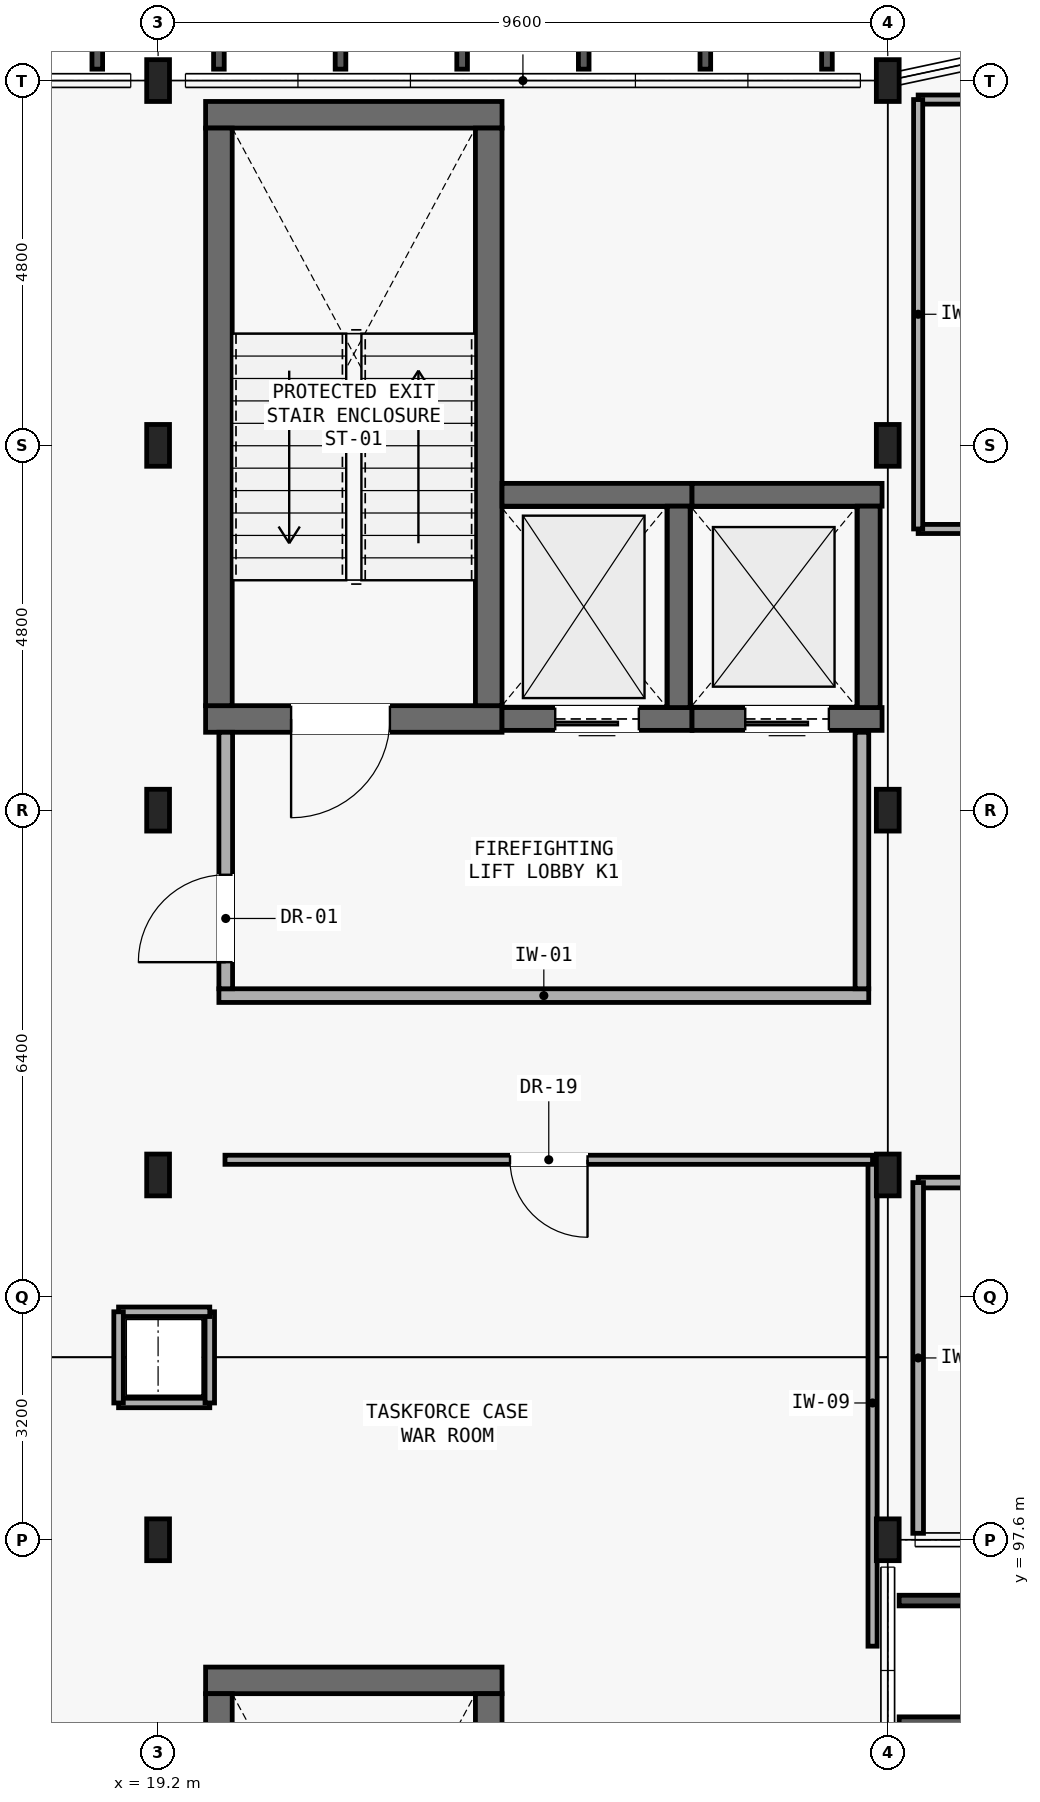
"""IFC4 building model, lengths in metres.
Left out: names, types, materials, properties, quantities, classifications, styles, units other than length and angle.
Written with IfcOpenShell. Run it as: python <this file> out.ifc"""

import sys

from ifc_helpers import new_model, si_unit, direction, frame, frame_2d, origin, origin_2d, place, context, subcontext, project, spatial, rectangle, i_section, extrude, element, fill, save


model = new_model("IFC4")
c1 = context("Model", 3, precision=1e-05, world=origin(), true_north=direction((0.0, 1.0)))
c2 = subcontext(c1, "Body", "Model", "MODEL_VIEW")
j1 = project(units=[si_unit("LENGTHUNIT", "METRE"), si_unit("PLANEANGLEUNIT", "RADIAN")], contexts=[c1])
p1 = place(None, origin())
s1 = spatial("IfcSite", under=j1, at=p1, CompositionType="ELEMENT")
p2 = place(p1, origin())
s2 = spatial("IfcBuilding", under=s1, at=p2, CompositionType="ELEMENT")
p3 = place(p2, frame((0.0, 0.0, 9.45)))
s3 = spatial("IfcBuildingStorey", under=s2, at=p3, CompositionType="ELEMENT", Elevation=9.45)
for number, where, z_axis, x_axis in (
    (1, (28.8, 97.6, 0.0), (0.0, 0.0, 1.0), (1.0, 0.0, 0.0)),
    (2, (28.8, 102.4, 0.0), (0.0, 0.0, 1.0), (1.0, 0.0, 0.0)),
    (3, (28.8, 107.2, 0.0), (0.0, 0.0, 1.0), (1.0, 0.0, 0.0)),
    (4, (28.8, 112.0, 0.0), (0.0, 0.0, 1.0), (1.0, 0.0, 0.0)),
    (5, (28.8, 116.8, 0.0), (0.0, 0.0, 1.0), (1.0, 0.0, 0.0)),
    (6, (19.2, 116.8, 0.0), (0.0, 0.0, 1.0), (1.0, 0.0, 0.0)),
    (7, (19.2, 97.6, 0.0), (0.0, 0.0, 1.0), (1.0, 0.0, 0.0)),
    (8, (19.2, 102.4, 0.0), (0.0, 0.0, 1.0), (1.0, 0.0, 0.0)),
    (9, (19.2, 107.2, 0.0), (0.0, 0.0, 1.0), (1.0, 0.0, 0.0)),
    (10, (19.2, 112.0, 0.0), (0.0, 0.0, 1.0), (1.0, 0.0, 0.0)),
):
    element("IfcColumn", number, at=place(p3, frame(where, z_axis=z_axis, x_axis=x_axis)), inside=s3, PredefinedType="COLUMN", context=c2, shape_type="SweptSolid", body=[
        extrude(i_section(OverallWidth=0.3, OverallDepth=0.55, WebThickness=0.015, FlangeThickness=0.029, FilletRadius=0.027, at=origin_2d()), origin(), (0.0, 0.0, 1.0), 4.2),
    ])
p4 = place(p3, frame((19.825, 108.4, 0.0), z_axis=(0.0, 0.0, 1.0), x_axis=(1.0, 0.0, 0.0)))
e11 = element("IfcWall", 11, at=p4, inside=s3, PredefinedType="SHEAR", context=c2, shape_type="SweptSolid", body=[
    extrude(rectangle(XDim=3.9, YDim=0.35, at=frame_2d((1.95, 0.0))), origin(), (0.0, 0.0, 1.0), 3.97),
])
p5 = place(p4, frame((1.125, 0.0, 0.0)))
e12 = element("IfcOpeningElement", 12, at=p5, cuts=e11, PredefinedType="OPENING", context=c2, shape_type="SweptSolid", body=[
    extrude(rectangle(XDim=1.3, YDim=2.15, at=frame_2d((0.65, 1.075))), frame((0.0, 0.185, 0.0), z_axis=(0.0, -1.0, 0.0), x_axis=(1.0, 0.0, 0.0)), (0.0, 0.0, 1.0), 0.37),
])
p6 = place(p3, frame((19.825, 116.35, 0.0), z_axis=(0.0, 0.0, 1.0), x_axis=(1.0, 0.0, 0.0)))
e13 = element("IfcWall", 13, at=p6, inside=s3, PredefinedType="SHEAR", context=c2, shape_type="SweptSolid", body=[
    extrude(rectangle(XDim=3.9, YDim=0.35, at=frame_2d((1.95, 0.0))), origin(), (0.0, 0.0, 1.0), 3.97),
])
for number, where, z_axis, x_axis in (
    (14, (20.0, 108.575, 0.0), (0.0, 0.0, 1.0), (0.0, 1.0, 0.0)),
    (15, (23.55, 108.575, 0.0), (0.0, 0.0, 1.0), (0.0, 1.0, 0.0)),
):
    element("IfcWall", number, at=place(p3, frame(where, z_axis=z_axis, x_axis=x_axis)), inside=s3, PredefinedType="SHEAR", context=c2, shape_type="SweptSolid", body=[
        extrude(rectangle(XDim=7.6, YDim=0.35, at=frame_2d((3.8, 0.0))), origin(), (0.0, 0.0, 1.0), 3.97),
    ])
p7 = place(p3, frame((23.725, 108.4, 0.0), z_axis=(0.0, 0.0, 1.0), x_axis=(1.0, 0.0, 0.0)))
e16 = element("IfcWall", 16, at=p7, inside=s3, PredefinedType="SHEAR", context=c2, shape_type="SweptSolid", body=[
    extrude(rectangle(XDim=2.5, YDim=0.3, at=frame_2d((1.25, 0.0))), origin(), (0.0, 0.0, 1.0), 3.97),
])
p8 = place(p7, frame((0.7, 0.0, 0.0)))
e17 = element("IfcOpeningElement", 17, at=p8, cuts=e16, PredefinedType="OPENING", context=c2, shape_type="SweptSolid", body=[
    extrude(rectangle(XDim=1.1, YDim=2.1, at=frame_2d((0.55, 1.05))), frame((0.0, 0.16, 0.0), z_axis=(0.0, -1.0, 0.0), x_axis=(1.0, 0.0, 0.0)), (0.0, 0.0, 1.0), 0.32),
])
p9 = place(p3, frame((23.725, 111.35, 0.0), z_axis=(0.0, 0.0, 1.0), x_axis=(1.0, 0.0, 0.0)))
e18 = element("IfcWall", 18, at=p9, inside=s3, PredefinedType="SHEAR", context=c2, shape_type="SweptSolid", body=[
    extrude(rectangle(XDim=2.5, YDim=0.3, at=frame_2d((1.25, 0.0))), origin(), (0.0, 0.0, 1.0), 3.97),
])
p10 = place(p3, frame((26.05, 108.55, 0.0), z_axis=(0.0, 0.0, 1.0), x_axis=(0.0, 1.0, 0.0)))
e19 = element("IfcWall", 19, at=p10, inside=s3, PredefinedType="SHEAR", context=c2, shape_type="SweptSolid", body=[
    extrude(rectangle(XDim=2.65, YDim=0.3, at=frame_2d((1.325, 0.0))), origin(), (0.0, 0.0, 1.0), 3.97),
])
p11 = place(p3, frame((26.225, 108.4, 0.0), z_axis=(0.0, 0.0, 1.0), x_axis=(1.0, 0.0, 0.0)))
e20 = element("IfcWall", 20, at=p11, inside=s3, PredefinedType="SHEAR", context=c2, shape_type="SweptSolid", body=[
    extrude(rectangle(XDim=2.5, YDim=0.3, at=frame_2d((1.25, 0.0))), origin(), (0.0, 0.0, 1.0), 3.97),
])
p12 = place(p11, frame((0.7, 0.0, 0.0)))
e21 = element("IfcOpeningElement", 21, at=p12, cuts=e20, PredefinedType="OPENING", context=c2, shape_type="SweptSolid", body=[
    extrude(rectangle(XDim=1.1, YDim=2.1, at=frame_2d((0.55, 1.05))), frame((0.0, 0.16, 0.0), z_axis=(0.0, -1.0, 0.0), x_axis=(1.0, 0.0, 0.0)), (0.0, 0.0, 1.0), 0.32),
])
p13 = place(p3, frame((26.225, 111.35, 0.0), z_axis=(0.0, 0.0, 1.0), x_axis=(1.0, 0.0, 0.0)))
e22 = element("IfcWall", 22, at=p13, inside=s3, PredefinedType="SHEAR", context=c2, shape_type="SweptSolid", body=[
    extrude(rectangle(XDim=2.5, YDim=0.3, at=frame_2d((1.25, 0.0))), origin(), (0.0, 0.0, 1.0), 3.97),
])
p14 = place(p3, frame((28.55, 108.55, 0.0), z_axis=(0.0, 0.0, 1.0), x_axis=(0.0, 1.0, 0.0)))
e23 = element("IfcWall", 23, at=p14, inside=s3, PredefinedType="SHEAR", context=c2, shape_type="SweptSolid", body=[
    extrude(rectangle(XDim=2.65, YDim=0.3, at=frame_2d((1.325, 0.0))), origin(), (0.0, 0.0, 1.0), 3.97),
])
p15 = place(p3, frame((20.0, 104.76, 0.0), z_axis=(0.0, 0.0, 1.0), x_axis=(1.0, 0.0, 0.0)))
e24 = element("IfcWall", 24, at=p15, inside=s3, PredefinedType="PARTITIONING", context=c2, shape_type="SweptSolid", body=[
    extrude(rectangle(XDim=8.55, YDim=0.18, at=frame_2d((4.275, 0.0))), origin(), (0.0, 0.0, 1.0), 3.45),
])
p16 = place(p3, frame((20.09, 104.85, 0.0), z_axis=(0.0, 0.0, 1.0), x_axis=(0.0, 1.0, 0.0)))
e25 = element("IfcWall", 25, at=p16, inside=s3, PredefinedType="PARTITIONING", context=c2, shape_type="SweptSolid", body=[
    extrude(rectangle(XDim=3.375, YDim=0.18, at=frame_2d((1.688, 0.0))), origin(), (0.0, 0.0, 1.0), 3.97),
])
p17 = place(p16, frame((0.35, 0.0, 0.0)))
e26 = element("IfcOpeningElement", 26, at=p17, cuts=e25, PredefinedType="OPENING", context=c2, shape_type="SweptSolid", body=[
    extrude(rectangle(XDim=1.15, YDim=2.15, at=frame_2d((0.575, 1.075))), frame((0.0, 0.1, 0.0), z_axis=(0.0, -1.0, 0.0), x_axis=(1.0, 0.0, 0.0)), (0.0, 0.0, 1.0), 0.2),
])
p18 = place(p3, frame((28.46, 104.85, 0.0), z_axis=(0.0, 0.0, 1.0), x_axis=(0.0, 1.0, 0.0)))
e27 = element("IfcWall", 27, at=p18, inside=s3, PredefinedType="PARTITIONING", context=c2, shape_type="SweptSolid", body=[
    extrude(rectangle(XDim=3.375, YDim=0.18, at=frame_2d((1.688, 0.0))), origin(), (0.0, 0.0, 1.0), 3.97),
])
p19 = place(p3, frame((19.825, 95.75, 0.0), z_axis=(0.0, 0.0, 1.0), x_axis=(1.0, 0.0, 0.0)))
e28 = element("IfcWall", 28, at=p19, inside=s3, PredefinedType="SHEAR", context=c2, shape_type="SweptSolid", body=[
    extrude(rectangle(XDim=3.9, YDim=0.35, at=frame_2d((1.95, 0.0))), origin(), (0.0, 0.0, 1.0), 3.97),
])
for number, where, z_axis, x_axis in (
    (29, (20.0, 87.975, 0.0), (0.0, 0.0, 1.0), (0.0, 1.0, 0.0)),
    (30, (23.55, 87.975, 0.0), (0.0, 0.0, 1.0), (0.0, 1.0, 0.0)),
):
    element("IfcWall", number, at=place(p3, frame(where, z_axis=z_axis, x_axis=x_axis)), inside=s3, PredefinedType="SHEAR", context=c2, shape_type="SweptSolid", body=[
        extrude(rectangle(XDim=7.6, YDim=0.35, at=frame_2d((3.8, 0.0))), origin(), (0.0, 0.0, 1.0), 3.97),
    ])
p20 = place(p3, frame((18.68, 99.4, 0.0), z_axis=(0.0, 0.0, 1.0), x_axis=(1.0, 0.0, 0.0)))
e31 = element("IfcWall", 31, at=p20, inside=s3, PredefinedType="PARTITIONING", context=c2, shape_type="SweptSolid", body=[
    extrude(rectangle(XDim=1.2, YDim=0.125, at=frame_2d((0.6, 0.0))), origin(), (0.0, 0.0, 1.0), 3.97),
])
p21 = place(p3, frame((19.88, 99.4, 0.0), z_axis=(0.0, 0.0, 1.0), x_axis=(0.0, 1.0, 0.0)))
e32 = element("IfcWall", 32, at=p21, inside=s3, PredefinedType="PARTITIONING", context=c2, shape_type="SweptSolid", body=[
    extrude(rectangle(XDim=1.2, YDim=0.125, at=frame_2d((0.6, 0.0))), origin(), (0.0, 0.0, 1.0), 3.97),
])
p22 = place(p3, frame((19.88, 100.6, 0.0), z_axis=(0.0, 0.0, 1.0), x_axis=(-1.0, 0.0, 0.0)))
e33 = element("IfcWall", 33, at=p22, inside=s3, PredefinedType="PARTITIONING", context=c2, shape_type="SweptSolid", body=[
    extrude(rectangle(XDim=1.2, YDim=0.125, at=frame_2d((0.6, 0.0))), origin(), (0.0, 0.0, 1.0), 3.97),
])
p23 = place(p3, frame((18.68, 100.6, 0.0), z_axis=(0.0, 0.0, 1.0), x_axis=(0.0, -1.0, 0.0)))
e34 = element("IfcWall", 34, at=p23, inside=s3, PredefinedType="PARTITIONING", context=c2, shape_type="SweptSolid", body=[
    extrude(rectangle(XDim=1.2, YDim=0.125, at=frame_2d((0.6, 0.0))), origin(), (0.0, 0.0, 1.0), 3.97),
])
p24 = place(p3, frame((28.6, 96.2, 0.0), z_axis=(0.0, 0.0, 1.0), x_axis=(0.0, 1.0, 0.0)))
e35 = element("IfcWall", 35, at=p24, inside=s3, PredefinedType="PARTITIONING", context=c2, shape_type="SweptSolid", body=[
    extrude(rectangle(XDim=6.4, YDim=0.12, at=frame_2d((3.2, 0.0))), origin(), (0.0, 0.0, 1.0), 3.41),
])
p25 = place(p3, frame((28.6, 102.6, 0.0), z_axis=(0.0, 0.0, 1.0), x_axis=(-1.0, 0.0, 0.0)))
e36 = element("IfcWall", 36, at=p25, inside=s3, PredefinedType="PARTITIONING", context=c2, shape_type="SweptSolid", body=[
    extrude(rectangle(XDim=8.52, YDim=0.12, at=frame_2d((4.26, 0.0))), origin(), (0.0, 0.0, 1.0), 3.15),
])
p26 = place(p25, frame((3.75, 0.0, 0.0)))
e37 = element("IfcOpeningElement", 37, at=p26, cuts=e36, PredefinedType="OPENING", context=c2, shape_type="SweptSolid", body=[
    extrude(rectangle(XDim=1.02, YDim=2.1, at=frame_2d((0.51, 1.05))), frame((0.0, 0.07, 0.0), z_axis=(0.0, -1.0, 0.0), x_axis=(1.0, 0.0, 0.0)), (0.0, 0.0, 1.0), 0.14),
])
p27 = place(p3, frame((29.2, 110.9, 0.0), z_axis=(0.0, 0.0, 1.0), x_axis=(1.0, 0.0, 0.0)))
e38 = element("IfcWall", 38, at=p27, inside=s3, PredefinedType="PARTITIONING", context=c2, shape_type="SweptSolid", body=[
    extrude(rectangle(XDim=28.4, YDim=0.12, at=frame_2d((14.2, 0.0))), origin(), (0.0, 0.0, 1.0), 3.97),
])
p28 = place(p27, frame((13.71, 0.0, 0.0)))
e39 = element("IfcOpeningElement", 39, at=p28, cuts=e38, PredefinedType="OPENING", context=c2, shape_type="SweptSolid", body=[
    extrude(rectangle(XDim=0.98, YDim=2.1, at=frame_2d((0.49, 1.05))), frame((0.0, 0.07, 0.0), z_axis=(0.0, -1.0, 0.0), x_axis=(1.0, 0.0, 0.0)), (0.0, 0.0, 1.0), 0.14),
])
p29 = place(p3, frame((57.6, 116.55, 0.0), z_axis=(0.0, 0.0, 1.0), x_axis=(-1.0, 0.0, 0.0)))
e40 = element("IfcWall", 40, at=p29, inside=s3, PredefinedType="PARTITIONING", context=c2, shape_type="SweptSolid", body=[
    extrude(rectangle(XDim=28.4, YDim=0.12, at=frame_2d((14.2, 0.0))), origin(), (0.0, 0.0, 1.0), 3.64),
])
p30 = place(p3, frame((29.2, 116.55, 0.0), z_axis=(0.0, 0.0, 1.0), x_axis=(0.0, -1.0, 0.0)))
e41 = element("IfcWall", 41, at=p30, inside=s3, PredefinedType="PARTITIONING", context=c2, shape_type="SweptSolid", body=[
    extrude(rectangle(XDim=5.65, YDim=0.12, at=frame_2d((2.825, 0.0))), origin(), (0.0, 0.0, 1.0), 3.97),
])
p31 = place(p3, frame((57.6, 102.3, 0.0), z_axis=(0.0, 0.0, 1.0), x_axis=(-1.0, 0.0, 0.0)))
e42 = element("IfcWall", 42, at=p31, inside=s3, PredefinedType="PARTITIONING", context=c2, shape_type="SweptSolid", body=[
    extrude(rectangle(XDim=28.4, YDim=0.14, at=frame_2d((14.2, 0.0))), origin(), (0.0, 0.0, 1.0), 3.41),
])
p32 = place(p31, frame((13.68, 0.0, 0.0)))
e43 = element("IfcOpeningElement", 43, at=p32, cuts=e42, PredefinedType="OPENING", context=c2, shape_type="SweptSolid", body=[
    extrude(rectangle(XDim=1.04, YDim=2.08, at=frame_2d((0.52, 1.04))), frame((0.0, 0.08, 0.0), z_axis=(0.0, -1.0, 0.0), x_axis=(1.0, 0.0, 0.0)), (0.0, 0.0, 1.0), 0.16),
])
p33 = place(p3, frame((29.2, 102.3, 0.0), z_axis=(0.0, 0.0, 1.0), x_axis=(0.0, -1.0, 0.0)))
e44 = element("IfcWall", 44, at=p33, inside=s3, PredefinedType="PARTITIONING", context=c2, shape_type="SweptSolid", body=[
    extrude(rectangle(XDim=4.615, YDim=0.14, at=frame_2d((2.308, 0.0))), origin(), (0.0, 0.0, 1.0), 3.97),
])
p34 = place(p5, frame((1.3, 0.0, 0.0), z_axis=(0.0, 0.0, 1.0), x_axis=(-1.0, 0.0, 0.0)))
e45 = element("IfcDoor", 45, at=p34, inside=s3, OperationType="SINGLE_SWING_LEFT", PredefinedType="DOOR", context=c2, shape_type="SweptSolid", body=[
    extrude(rectangle(XDim=1.3, YDim=2.15, at=frame_2d((0.65, 1.075))), frame((0.0, 0.025, 0.0), z_axis=(0.0, -1.0, 0.0), x_axis=(1.0, 0.0, 0.0)), (0.0, 0.0, 1.0), 0.05),
])
fill(e12, e45)
p35 = place(p8, frame((1.1, 0.0, 0.0), z_axis=(0.0, 0.0, 1.0), x_axis=(-1.0, 0.0, 0.0)))
e46 = element("IfcDoor", 46, at=p35, inside=s3, OperationType="SLIDING_TO_LEFT", PredefinedType="DOOR", context=c2, shape_type="SweptSolid", body=[
    extrude(rectangle(XDim=1.1, YDim=2.1, at=frame_2d((0.55, 1.05))), frame((0.0, 0.025, 0.0), z_axis=(0.0, -1.0, 0.0), x_axis=(1.0, 0.0, 0.0)), (0.0, 0.0, 1.0), 0.05),
])
fill(e17, e46)
p36 = place(p12, frame((1.1, 0.0, 0.0), z_axis=(0.0, 0.0, 1.0), x_axis=(-1.0, 0.0, 0.0)))
e47 = element("IfcDoor", 47, at=p36, inside=s3, OperationType="SLIDING_TO_LEFT", PredefinedType="DOOR", context=c2, shape_type="SweptSolid", body=[
    extrude(rectangle(XDim=1.1, YDim=2.1, at=frame_2d((0.55, 1.05))), frame((0.0, 0.025, 0.0), z_axis=(0.0, -1.0, 0.0), x_axis=(1.0, 0.0, 0.0)), (0.0, 0.0, 1.0), 0.05),
])
fill(e21, e47)
p37 = place(p17, origin())
e48 = element("IfcDoor", 48, at=p37, inside=s3, OperationType="SINGLE_SWING_LEFT", PredefinedType="DOOR", context=c2, shape_type="SweptSolid", body=[
    extrude(rectangle(XDim=1.15, YDim=2.15, at=frame_2d((0.575, 1.075))), frame((0.0, 0.025, 0.0), z_axis=(0.0, -1.0, 0.0), x_axis=(1.0, 0.0, 0.0)), (0.0, 0.0, 1.0), 0.05),
])
fill(e26, e48)
p38 = place(p26, origin())
e49 = element("IfcDoor", 49, at=p38, inside=s3, OperationType="SINGLE_SWING_LEFT", PredefinedType="DOOR", context=c2, shape_type="SweptSolid", body=[
    extrude(rectangle(XDim=1.02, YDim=2.1, at=frame_2d((0.51, 1.05))), frame((0.0, 0.025, 0.0), z_axis=(0.0, -1.0, 0.0), x_axis=(1.0, 0.0, 0.0)), (0.0, 0.0, 1.0), 0.05),
])
fill(e37, e49)
save(model, sys.argv[1])
